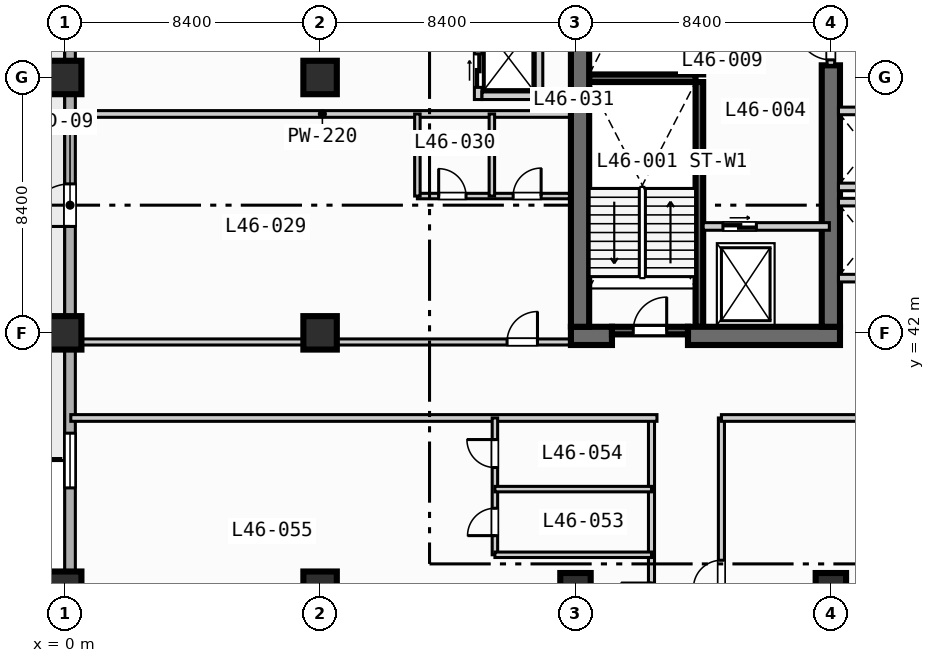
"""IFC4 building model, lengths in metres.
Left out: names, types, materials, properties, quantities, classifications, styles, units other than length and angle.
Written with IfcOpenShell. Run it as: python <this file> out.ifc"""

import sys

from ifc_helpers import new_model, si_unit, direction, frame, frame_2d, origin, origin_2d, place, context, subcontext, project, spatial, rectangle, extrude, element, fill, save


model = new_model("IFC4")
c1 = context("Model", 3, precision=1e-05, world=origin(), true_north=direction((0.0, 1.0)))
c2 = subcontext(c1, "Body", "Model", "MODEL_VIEW")
j1 = project(units=[si_unit("LENGTHUNIT", "METRE"), si_unit("PLANEANGLEUNIT", "RADIAN")], contexts=[c1])
p1 = place(None, origin())
s1 = spatial("IfcSite", under=j1, at=p1, CompositionType="ELEMENT")
p2 = place(p1, origin())
s2 = spatial("IfcBuilding", under=s1, at=p2, CompositionType="ELEMENT")
p3 = place(p2, frame((0.0, 0.0, 190.2)))
s3 = spatial("IfcBuildingStorey", under=s2, at=p3, CompositionType="ELEMENT", Elevation=190.2)
for number, where, z_axis, x_axis in (
    (1, (20.875, 42.2, 0.0), (0.0, 0.0, 1.0), (0.0, 1.0, 0.0)),
    (2, (20.875, 50.5, 0.0), (0.0, 0.0, 1.0), (0.0, 1.0, 0.0)),
):
    element("IfcWall", number, at=place(p3, frame(where, z_axis=z_axis, x_axis=x_axis)), inside=s3, PredefinedType="SOLIDWALL", context=c2, shape_type="SweptSolid", body=[
        extrude(rectangle(XDim=8.05, YDim=0.25, at=frame_2d((4.025, 0.0))), origin(), (0.0, 0.0, 1.0), 3.47),
    ])
p4 = place(p3, frame((17.25, 50.375, 0.0), z_axis=(0.0, 0.0, 1.0), x_axis=(1.0, 0.0, 0.0)))
e3 = element("IfcWall", 3, at=p4, inside=s3, PredefinedType="SOLIDWALL", context=c2, shape_type="SweptSolid", body=[
    extrude(rectangle(XDim=3.5, YDim=0.25, at=frame_2d((1.75, 0.0))), origin(), (0.0, 0.0, 1.0), 3.47),
])
p5 = place(p3, frame((16.65, 41.9, 0.0), z_axis=(0.0, 0.0, 1.0), x_axis=(1.0, 0.0, 0.0)))
e4 = element("IfcWall", 4, at=p5, inside=s3, PredefinedType="SHEAR", context=c2, shape_type="SweptSolid", body=[
    extrude(rectangle(XDim=1.35, YDim=0.6, at=frame_2d((0.675, 0.0))), origin(), (0.0, 0.0, 1.0), 3.47),
])
p6 = place(p3, frame((20.5, 41.9, 0.0), z_axis=(0.0, 0.0, 1.0), x_axis=(1.0, 0.0, 0.0)))
e5 = element("IfcWall", 5, at=p6, inside=s3, PredefinedType="SHEAR", context=c2, shape_type="SweptSolid", body=[
    extrude(rectangle(XDim=5.0, YDim=0.6, at=frame_2d((2.5, 0.0))), origin(), (0.0, 0.0, 1.0), 3.47),
])
p7 = place(p3, frame((16.95, 42.2, 0.0), z_axis=(0.0, 0.0, 1.0), x_axis=(0.0, 1.0, 0.0)))
e6 = element("IfcWall", 6, at=p7, inside=s3, PredefinedType="SHEAR", context=c2, shape_type="SweptSolid", body=[
    extrude(rectangle(XDim=16.35, YDim=0.6, at=frame_2d((8.175, 0.0))), origin(), (0.0, 0.0, 1.0), 3.47),
])
p8 = place(p3, frame((25.2, 42.2, 0.0), z_axis=(0.0, 0.0, 1.0), x_axis=(0.0, 1.0, 0.0)))
e7 = element("IfcWall", 7, at=p8, inside=s3, PredefinedType="SHEAR", context=c2, shape_type="SweptSolid", body=[
    extrude(rectangle(XDim=8.6, YDim=0.6, at=frame_2d((4.3, 0.0))), origin(), (0.0, 0.0, 1.0), 3.47),
])
for number, where, z_axis, x_axis in (
    (8, (0.0, 33.6, 0.0), (0.0, 0.0, 1.0), (1.0, 0.0, 0.0)),
    (9, (0.0, 42.0, 0.0), (0.0, 0.0, 1.0), (1.0, 0.0, 0.0)),
    (10, (0.0, 50.4, 0.0), (0.0, 0.0, 1.0), (1.0, 0.0, 0.0)),
    (11, (8.4, 33.6, 0.0), (0.0, 0.0, 1.0), (1.0, 0.0, 0.0)),
    (12, (8.4, 42.0, 0.0), (0.0, 0.0, 1.0), (1.0, 0.0, 0.0)),
    (13, (8.4, 50.4, 0.0), (0.0, 0.0, 1.0), (1.0, 0.0, 0.0)),
):
    element("IfcColumn", number, at=place(p3, frame(where, z_axis=z_axis, x_axis=x_axis)), inside=s3, PredefinedType="COLUMN", context=c2, shape_type="SweptSolid", body=[
        extrude(rectangle(XDim=1.1, YDim=1.1, at=origin_2d()), origin(), (0.0, 0.0, 1.0), 3.7),
    ])
for number, where, z_axis, x_axis in (
    (14, (16.8, 33.6, 0.0), (0.0, 0.0, 1.0), (1.0, 0.0, 0.0)),
    (15, (25.2, 33.6, 0.0), (0.0, 0.0, 1.0), (1.0, 0.0, 0.0)),
):
    element("IfcColumn", number, at=place(p3, frame(where, z_axis=z_axis, x_axis=x_axis)), inside=s3, PredefinedType="COLUMN", context=c2, shape_type="SweptSolid", body=[
        extrude(rectangle(XDim=1.0, YDim=1.0, at=origin_2d()), origin(), (0.0, 0.0, 1.0), 3.7),
    ])
p9 = place(p3, frame((0.175, 3.175, 0.0), z_axis=(0.0, 0.0, 1.0), x_axis=(0.0, 1.0, 0.0)))
e16 = element("IfcWall", 16, at=p9, inside=s3, PredefinedType="STANDARD", context=c2, shape_type="SweptSolid", body=[
    extrude(rectangle(XDim=69.25, YDim=0.35, at=frame_2d((34.625, 0.0))), origin(), (0.0, 0.0, 1.0), 3.47),
])
p10 = place(p9, frame((42.325, 0.0, 0.0)))
e17 = element("IfcOpeningElement", 17, at=p10, cuts=e16, PredefinedType="OPENING", context=c2, shape_type="SweptSolid", body=[
    extrude(rectangle(XDim=1.4, YDim=2.2, at=frame_2d((0.7, 1.1))), frame((0.0, 0.185, 0.0), z_axis=(0.0, -1.0, 0.0), x_axis=(1.0, 0.0, 0.0)), (0.0, 0.0, 1.0), 0.37),
])
p11 = place(p9, frame((25.025, 0.0, 0.85)))
e18 = element("IfcOpeningElement", 18, at=p11, cuts=e16, PredefinedType="OPENING", context=c2, shape_type="SweptSolid", body=[
    extrude(rectangle(XDim=2.4, YDim=1.95, at=frame_2d((1.2, 0.975))), frame((0.0, 0.185, 0.0), z_axis=(0.0, -1.0, 0.0), x_axis=(1.0, 0.0, 0.0)), (0.0, 0.0, 1.0), 0.37),
])
p12 = place(p9, frame((33.725, 0.0, 0.85)))
e19 = element("IfcOpeningElement", 19, at=p12, cuts=e16, PredefinedType="OPENING", context=c2, shape_type="SweptSolid", body=[
    extrude(rectangle(XDim=1.8, YDim=1.8, at=frame_2d((0.9, 0.9))), frame((0.0, 0.185, 0.0), z_axis=(0.0, -1.0, 0.0), x_axis=(1.0, 0.0, 0.0)), (0.0, 0.0, 1.0), 0.37),
])
p13 = place(p9, frame((58.375, 0.0, 0.85)))
e20 = element("IfcOpeningElement", 20, at=p13, cuts=e16, PredefinedType="OPENING", context=c2, shape_type="SweptSolid", body=[
    extrude(rectangle(XDim=1.8, YDim=1.8, at=frame_2d((0.9, 0.9))), frame((0.0, 0.185, 0.0), z_axis=(0.0, -1.0, 0.0), x_axis=(1.0, 0.0, 0.0)), (0.0, 0.0, 1.0), 0.37),
])
p14 = place(p9, frame((64.775, 0.0, 0.85)))
e21 = element("IfcOpeningElement", 21, at=p14, cuts=e16, PredefinedType="OPENING", context=c2, shape_type="SweptSolid", body=[
    extrude(rectangle(XDim=1.8, YDim=1.8, at=frame_2d((0.9, 0.9))), frame((0.0, 0.185, 0.0), z_axis=(0.0, -1.0, 0.0), x_axis=(1.0, 0.0, 0.0)), (0.0, 0.0, 1.0), 0.37),
])
p15 = place(p3, frame((18.0, 42.075, 0.0), z_axis=(0.0, 0.0, 1.0), x_axis=(1.0, 0.0, 0.0)))
e22 = element("IfcWall", 22, at=p15, inside=s3, PredefinedType="SOLIDWALL", context=c2, shape_type="SweptSolid", body=[
    extrude(rectangle(XDim=2.5, YDim=0.25, at=frame_2d((1.25, 0.0))), origin(), (0.0, 0.0, 1.0), 3.47),
])
p16 = place(p15, frame((0.7, 0.0, 0.0)))
e23 = element("IfcOpeningElement", 23, at=p16, cuts=e22, PredefinedType="OPENING", context=c2, shape_type="SweptSolid", body=[
    extrude(rectangle(XDim=1.1, YDim=2.15, at=frame_2d((0.55, 1.075))), frame((0.0, 0.135, 0.0), z_axis=(0.0, -1.0, 0.0), x_axis=(1.0, 0.0, 0.0)), (0.0, 0.0, 1.0), 0.27),
])
p17 = place(p3, frame((21.0, 45.5, 0.0), z_axis=(0.0, 0.0, 1.0), x_axis=(1.0, 0.0, 0.0)))
e24 = element("IfcWall", 24, at=p17, inside=s3, PredefinedType="SOLIDWALL", context=c2, shape_type="SweptSolid", body=[
    extrude(rectangle(XDim=4.15, YDim=0.25, at=frame_2d((2.075, 0.0))), origin(), (0.0, 0.0, 1.0), 3.47),
])
p18 = place(p17, frame((0.65, 0.0, 0.0)))
e25 = element("IfcOpeningElement", 25, at=p18, cuts=e24, PredefinedType="OPENING", context=c2, shape_type="SweptSolid", body=[
    extrude(rectangle(XDim=1.1, YDim=2.15, at=frame_2d((0.55, 1.075))), frame((0.0, 0.135, 0.0), z_axis=(0.0, -1.0, 0.0), x_axis=(1.0, 0.0, 0.0)), (0.0, 0.0, 1.0), 0.27),
])
p19 = place(p3, frame((25.2, 50.8, 0.0), z_axis=(0.0, 0.0, 1.0), x_axis=(0.0, 1.0, 0.0)))
e26 = element("IfcWall", 26, at=p19, inside=s3, PredefinedType="SOLIDWALL", context=c2, shape_type="SweptSolid", body=[
    extrude(rectangle(XDim=1.48, YDim=0.25, at=frame_2d((0.74, 0.0))), origin(), (0.0, 0.0, 1.0), 3.47),
])
p20 = place(p19, frame((0.18, 0.0, 0.0)))
e27 = element("IfcOpeningElement", 27, at=p20, cuts=e26, PredefinedType="OPENING", context=c2, shape_type="SweptSolid", body=[
    extrude(rectangle(XDim=1.1, YDim=2.15, at=frame_2d((0.55, 1.075))), frame((0.0, 0.135, 0.0), z_axis=(0.0, -1.0, 0.0), x_axis=(1.0, 0.0, 0.0)), (0.0, 0.0, 1.0), 0.27),
])
p21 = place(p3, frame((13.6, 49.675, 0.0), z_axis=(0.0, 0.0, 1.0), x_axis=(0.0, 1.0, 0.0)))
e28 = element("IfcWall", 28, at=p21, inside=s3, PredefinedType="SOLIDWALL", context=c2, shape_type="SweptSolid", body=[
    extrude(rectangle(XDim=2.75, YDim=0.25, at=frame_2d((1.375, 0.0))), origin(), (0.0, 0.0, 1.0), 3.47),
])
p22 = place(p21, frame((0.4, 0.0, 0.0)))
e29 = element("IfcOpeningElement", 29, at=p22, cuts=e28, PredefinedType="OPENING", context=c2, shape_type="SweptSolid", body=[
    extrude(rectangle(XDim=1.1, YDim=2.15, at=frame_2d((0.55, 1.075))), frame((0.0, 0.135, 0.0), z_axis=(0.0, -1.0, 0.0), x_axis=(1.0, 0.0, 0.0)), (0.0, 0.0, 1.0), 0.27),
])
p23 = place(p3, frame((15.6, 49.675, 0.0), z_axis=(0.0, 0.0, 1.0), x_axis=(0.0, 1.0, 0.0)))
e30 = element("IfcWall", 30, at=p23, inside=s3, PredefinedType="SOLIDWALL", context=c2, shape_type="SweptSolid", body=[
    extrude(rectangle(XDim=2.75, YDim=0.25, at=frame_2d((1.375, 0.0))), origin(), (0.0, 0.0, 1.0), 3.47),
])
p24 = place(p3, frame((13.725, 49.8, 0.0), z_axis=(0.0, 0.0, 1.0), x_axis=(1.0, 0.0, 0.0)))
e31 = element("IfcWall", 31, at=p24, inside=s3, PredefinedType="SOLIDWALL", context=c2, shape_type="SweptSolid", body=[
    extrude(rectangle(XDim=1.75, YDim=0.25, at=frame_2d((0.875, 0.0))), origin(), (0.0, 0.0, 1.0), 3.47),
])
for number, where, z_axis, x_axis in (
    (32, (25.45, 43.8, 0.0), (0.0, 0.0, 1.0), (1.0, 0.0, 0.0)),
    (33, (25.45, 46.3, 0.0), (0.0, 0.0, 1.0), (1.0, 0.0, 0.0)),
    (34, (25.45, 46.8, 0.0), (0.0, 0.0, 1.0), (1.0, 0.0, 0.0)),
    (35, (25.45, 49.3, 0.0), (0.0, 0.0, 1.0), (1.0, 0.0, 0.0)),
):
    element("IfcWall", number, at=place(p3, frame(where, z_axis=z_axis, x_axis=x_axis)), inside=s3, PredefinedType="SOLIDWALL", context=c2, shape_type="SweptSolid", body=[
        extrude(rectangle(XDim=1.825, YDim=0.25, at=frame_2d((0.913, 0.0))), origin(), (0.0, 0.0, 1.0), 3.47),
    ])
p25 = place(p3, frame((0.35, 41.7, 0.0), z_axis=(0.0, 0.0, 1.0), x_axis=(1.0, 0.0, 0.0)))
e36 = element("IfcWall", 36, at=p25, inside=s3, PredefinedType="PARTITIONING", context=c2, shape_type="SweptSolid", body=[
    extrude(rectangle(XDim=16.25, YDim=0.2, at=frame_2d((8.125, 0.0))), origin(), (0.0, 0.0, 1.0), 2.82),
])
p26 = place(p25, frame((14.2, 0.0, 0.0)))
e37 = element("IfcOpeningElement", 37, at=p26, cuts=e36, PredefinedType="OPENING", context=c2, shape_type="SweptSolid", body=[
    extrude(rectangle(XDim=1.0, YDim=2.15, at=frame_2d((0.5, 1.075))), frame((0.0, 0.11, 0.0), z_axis=(0.0, -1.0, 0.0), x_axis=(1.0, 0.0, 0.0)), (0.0, 0.0, 1.0), 0.22),
])
p27 = place(p3, frame((0.35, 49.2, 0.0), z_axis=(0.0, 0.0, 1.0), x_axis=(1.0, 0.0, 0.0)))
e38 = element("IfcWall", 38, at=p27, inside=s3, PredefinedType="PARTITIONING", context=c2, shape_type="SweptSolid", body=[
    extrude(rectangle(XDim=16.25, YDim=0.22, at=frame_2d((8.125, 0.0))), origin(), (0.0, 0.0, 1.0), 3.47),
])
p28 = place(p3, frame((11.6, 46.5, 0.0), z_axis=(0.0, 0.0, 1.0), x_axis=(1.0, 0.0, 0.0)))
e39 = element("IfcWall", 39, at=p28, inside=s3, PredefinedType="PLUMBINGWALL", context=c2, shape_type="SweptSolid", body=[
    extrude(rectangle(XDim=5.0, YDim=0.18, at=frame_2d((2.5, 0.0))), origin(), (0.0, 0.0, 1.0), 3.47),
])
p29 = place(p28, frame((0.7, 0.0, 0.0)))
e40 = element("IfcOpeningElement", 40, at=p29, cuts=e39, PredefinedType="OPENING", context=c2, shape_type="SweptSolid", body=[
    extrude(rectangle(XDim=0.9, YDim=2.1, at=frame_2d((0.45, 1.05))), frame((0.0, 0.1, 0.0), z_axis=(0.0, -1.0, 0.0), x_axis=(1.0, 0.0, 0.0)), (0.0, 0.0, 1.0), 0.2),
])
p30 = place(p28, frame((3.15, 0.0, 0.0)))
e41 = element("IfcOpeningElement", 41, at=p30, cuts=e39, PredefinedType="OPENING", context=c2, shape_type="SweptSolid", body=[
    extrude(rectangle(XDim=0.92, YDim=2.1, at=frame_2d((0.46, 1.05))), frame((0.0, 0.1, 0.0), z_axis=(0.0, -1.0, 0.0), x_axis=(1.0, 0.0, 0.0)), (0.0, 0.0, 1.0), 0.2),
])
for number, where, z_axis, x_axis in (
    (42, (11.6, 46.5, 0.0), (0.0, 0.0, 1.0), (0.0, 1.0, 0.0)),
    (43, (14.05, 46.5, 0.0), (0.0, 0.0, 1.0), (0.0, 1.0, 0.0)),
):
    element("IfcWall", number, at=place(p3, frame(where, z_axis=z_axis, x_axis=x_axis)), inside=s3, PredefinedType="PLUMBINGWALL", context=c2, shape_type="SweptSolid", body=[
        extrude(rectangle(XDim=2.7, YDim=0.18, at=frame_2d((1.35, 0.0))), origin(), (0.0, 0.0, 1.0), 3.47),
    ])
p31 = place(p3, frame((21.6, 24.2, 0.0), z_axis=(0.0, 0.0, 1.0), x_axis=(0.0, 1.0, 0.0)))
e44 = element("IfcWall", 44, at=p31, inside=s3, PredefinedType="PARTITIONING", context=c2, shape_type="SweptSolid", body=[
    extrude(rectangle(XDim=15.0, YDim=0.2, at=frame_2d((7.5, 0.0))), origin(), (0.0, 0.0, 1.0), 3.47),
])
p32 = place(p31, frame((2.0, 0.0, 0.0)))
e45 = element("IfcOpeningElement", 45, at=p32, cuts=e44, PredefinedType="OPENING", context=c2, shape_type="SweptSolid", body=[
    extrude(rectangle(XDim=0.92, YDim=2.1, at=frame_2d((0.46, 1.05))), frame((0.0, 0.11, 0.0), z_axis=(0.0, -1.0, 0.0), x_axis=(1.0, 0.0, 0.0)), (0.0, 0.0, 1.0), 0.22),
])
p33 = place(p31, frame((9.4, 0.0, 0.0)))
e46 = element("IfcOpeningElement", 46, at=p33, cuts=e44, PredefinedType="OPENING", context=c2, shape_type="SweptSolid", body=[
    extrude(rectangle(XDim=0.92, YDim=2.1, at=frame_2d((0.46, 1.05))), frame((0.0, 0.11, 0.0), z_axis=(0.0, -1.0, 0.0), x_axis=(1.0, 0.0, 0.0)), (0.0, 0.0, 1.0), 0.22),
])
p34 = place(p3, frame((21.6, 39.2, 0.0), z_axis=(0.0, 0.0, 1.0), x_axis=(1.0, 0.0, 0.0)))
e47 = element("IfcWall", 47, at=p34, inside=s3, PredefinedType="PARTITIONING", context=c2, shape_type="SweptSolid", body=[
    extrude(rectangle(XDim=11.7, YDim=0.22, at=frame_2d((5.85, 0.0))), origin(), (0.0, 0.0, 1.0), 3.47),
])
p35 = place(p3, frame((19.3, 24.4, 0.0), z_axis=(0.0, 0.0, 1.0), x_axis=(0.0, 1.0, 0.0)))
e48 = element("IfcWall", 48, at=p35, inside=s3, PredefinedType="PARTITIONING", context=c2, shape_type="SweptSolid", body=[
    extrude(rectangle(XDim=14.8, YDim=0.2, at=frame_2d((7.4, 0.0))), origin(), (0.0, 0.0, 1.0), 3.47),
])
p36 = place(p35, frame((0.97, 0.0, 0.0)))
e49 = element("IfcOpeningElement", 49, at=p36, cuts=e48, PredefinedType="OPENING", context=c2, shape_type="SweptSolid", body=[
    extrude(rectangle(XDim=1.0, YDim=2.15, at=frame_2d((0.5, 1.075))), frame((0.0, 0.11, 0.0), z_axis=(0.0, -1.0, 0.0), x_axis=(1.0, 0.0, 0.0)), (0.0, 0.0, 1.0), 0.22),
])
p37 = place(p35, frame((8.37, 0.0, 0.0)))
e50 = element("IfcOpeningElement", 50, at=p37, cuts=e48, PredefinedType="OPENING", context=c2, shape_type="SweptSolid", body=[
    extrude(rectangle(XDim=1.0, YDim=2.15, at=frame_2d((0.5, 1.075))), frame((0.0, 0.11, 0.0), z_axis=(0.0, -1.0, 0.0), x_axis=(1.0, 0.0, 0.0)), (0.0, 0.0, 1.0), 0.22),
])
p38 = place(p3, frame((0.2, 39.2, 0.0), z_axis=(0.0, 0.0, 1.0), x_axis=(1.0, 0.0, 0.0)))
e51 = element("IfcWall", 51, at=p38, inside=s3, PredefinedType="PARTITIONING", context=c2, shape_type="SweptSolid", body=[
    extrude(rectangle(XDim=19.28, YDim=0.22, at=frame_2d((9.64, 0.0))), origin(), (0.0, 0.0, 1.0), 3.47),
])
p39 = place(p3, frame((14.15, 34.7, 0.0), z_axis=(0.0, 0.0, 1.0), x_axis=(0.0, 1.0, 0.0)))
e52 = element("IfcWall", 52, at=p39, inside=s3, PredefinedType="PLUMBINGWALL", context=c2, shape_type="SweptSolid", body=[
    extrude(rectangle(XDim=4.5, YDim=0.18, at=frame_2d((2.25, 0.0))), origin(), (0.0, 0.0, 1.0), 3.47),
])
p40 = place(p39, frame((0.63, 0.0, 0.0)))
e53 = element("IfcOpeningElement", 53, at=p40, cuts=e52, PredefinedType="OPENING", context=c2, shape_type="SweptSolid", body=[
    extrude(rectangle(XDim=0.9, YDim=2.1, at=frame_2d((0.45, 1.05))), frame((0.0, 0.1, 0.0), z_axis=(0.0, -1.0, 0.0), x_axis=(1.0, 0.0, 0.0)), (0.0, 0.0, 1.0), 0.2),
])
p41 = place(p39, frame((2.87, 0.0, 0.0)))
e54 = element("IfcOpeningElement", 54, at=p41, cuts=e52, PredefinedType="OPENING", context=c2, shape_type="SweptSolid", body=[
    extrude(rectangle(XDim=0.92, YDim=2.1, at=frame_2d((0.46, 1.05))), frame((0.0, 0.1, 0.0), z_axis=(0.0, -1.0, 0.0), x_axis=(1.0, 0.0, 0.0)), (0.0, 0.0, 1.0), 0.2),
])
for number, where, z_axis, x_axis in (
    (55, (14.15, 34.7, 0.0), (0.0, 0.0, 1.0), (1.0, 0.0, 0.0)),
    (56, (14.15, 36.86, 0.0), (0.0, 0.0, 1.0), (1.0, 0.0, 0.0)),
):
    element("IfcWall", number, at=place(p3, frame(where, z_axis=z_axis, x_axis=x_axis)), inside=s3, PredefinedType="PLUMBINGWALL", context=c2, shape_type="SweptSolid", body=[
        extrude(rectangle(XDim=5.15, YDim=0.18, at=frame_2d((2.575, 0.0))), origin(), (0.0, 0.0, 1.0), 3.47),
    ])
p42 = place(p10, origin())
e57 = element("IfcDoor", 57, at=p42, inside=s3, OperationType="SINGLE_SWING_LEFT", PredefinedType="DOOR", context=c2, shape_type="SweptSolid", body=[
    extrude(rectangle(XDim=1.4, YDim=2.2, at=frame_2d((0.7, 1.1))), frame((0.0, 0.025, 0.0), z_axis=(0.0, -1.0, 0.0), x_axis=(1.0, 0.0, 0.0)), (0.0, 0.0, 1.0), 0.05),
])
fill(e17, e57)
p43 = place(p12, origin())
e58 = element("IfcWindow", 58, at=p43, inside=s3, PartitioningType="SINGLE_PANEL", PredefinedType="WINDOW", context=c2, shape_type="SweptSolid", body=[
    extrude(rectangle(XDim=1.8, YDim=1.8, at=frame_2d((0.9, 0.9))), frame((0.0, 0.03, 0.0), z_axis=(0.0, -1.0, 0.0), x_axis=(1.0, 0.0, 0.0)), (0.0, 0.0, 1.0), 0.06),
])
fill(e19, e58)
p44 = place(p16, origin())
e59 = element("IfcDoor", 59, at=p44, inside=s3, OperationType="SINGLE_SWING_RIGHT", PredefinedType="DOOR", context=c2, shape_type="SweptSolid", body=[
    extrude(rectangle(XDim=1.1, YDim=2.15, at=frame_2d((0.55, 1.075))), frame((0.0, 0.025, 0.0), z_axis=(0.0, -1.0, 0.0), x_axis=(1.0, 0.0, 0.0)), (0.0, 0.0, 1.0), 0.05),
])
fill(e23, e59)
p45 = place(p18, origin())
e60 = element("IfcDoor", 60, at=p45, inside=s3, OperationType="SLIDING_TO_LEFT", PredefinedType="DOOR", context=c2, shape_type="SweptSolid", body=[
    extrude(rectangle(XDim=1.1, YDim=2.15, at=frame_2d((0.55, 1.075))), frame((0.0, 0.025, 0.0), z_axis=(0.0, -1.0, 0.0), x_axis=(1.0, 0.0, 0.0)), (0.0, 0.0, 1.0), 0.05),
])
fill(e25, e60)
p46 = place(p20, origin())
e61 = element("IfcDoor", 61, at=p46, inside=s3, OperationType="SINGLE_SWING_RIGHT", PredefinedType="DOOR", context=c2, shape_type="SweptSolid", body=[
    extrude(rectangle(XDim=1.1, YDim=2.15, at=frame_2d((0.55, 1.075))), frame((0.0, 0.025, 0.0), z_axis=(0.0, -1.0, 0.0), x_axis=(1.0, 0.0, 0.0)), (0.0, 0.0, 1.0), 0.05),
])
fill(e27, e61)
p47 = place(p22, origin())
e62 = element("IfcDoor", 62, at=p47, inside=s3, OperationType="SLIDING_TO_LEFT", PredefinedType="DOOR", context=c2, shape_type="SweptSolid", body=[
    extrude(rectangle(XDim=1.1, YDim=2.15, at=frame_2d((0.55, 1.075))), frame((0.0, 0.025, 0.0), z_axis=(0.0, -1.0, 0.0), x_axis=(1.0, 0.0, 0.0)), (0.0, 0.0, 1.0), 0.05),
])
fill(e29, e62)
p48 = place(p26, origin())
e63 = element("IfcDoor", 63, at=p48, inside=s3, OperationType="SINGLE_SWING_RIGHT", PredefinedType="DOOR", context=c2, shape_type="SweptSolid", body=[
    extrude(rectangle(XDim=1.0, YDim=2.15, at=frame_2d((0.5, 1.075))), frame((0.0, 0.025, 0.0), z_axis=(0.0, -1.0, 0.0), x_axis=(1.0, 0.0, 0.0)), (0.0, 0.0, 1.0), 0.05),
])
fill(e37, e63)
p49 = place(p29, origin())
e64 = element("IfcDoor", 64, at=p49, inside=s3, OperationType="SINGLE_SWING_LEFT", PredefinedType="DOOR", context=c2, shape_type="SweptSolid", body=[
    extrude(rectangle(XDim=0.9, YDim=2.1, at=frame_2d((0.45, 1.05))), frame((0.0, 0.025, 0.0), z_axis=(0.0, -1.0, 0.0), x_axis=(1.0, 0.0, 0.0)), (0.0, 0.0, 1.0), 0.05),
])
fill(e40, e64)
p50 = place(p30, origin())
e65 = element("IfcDoor", 65, at=p50, inside=s3, OperationType="SINGLE_SWING_RIGHT", PredefinedType="DOOR", context=c2, shape_type="SweptSolid", body=[
    extrude(rectangle(XDim=0.92, YDim=2.1, at=frame_2d((0.46, 1.05))), frame((0.0, 0.025, 0.0), z_axis=(0.0, -1.0, 0.0), x_axis=(1.0, 0.0, 0.0)), (0.0, 0.0, 1.0), 0.05),
])
fill(e41, e65)
p51 = place(p33, origin())
e66 = element("IfcDoor", 66, at=p51, inside=s3, OperationType="SINGLE_SWING_LEFT", PredefinedType="DOOR", context=c2, shape_type="SweptSolid", body=[
    extrude(rectangle(XDim=0.92, YDim=2.1, at=frame_2d((0.46, 1.05))), frame((0.0, 0.025, 0.0), z_axis=(0.0, -1.0, 0.0), x_axis=(1.0, 0.0, 0.0)), (0.0, 0.0, 1.0), 0.05),
])
fill(e46, e66)
p52 = place(p40, origin())
e67 = element("IfcDoor", 67, at=p52, inside=s3, OperationType="SINGLE_SWING_LEFT", PredefinedType="DOOR", context=c2, shape_type="SweptSolid", body=[
    extrude(rectangle(XDim=0.9, YDim=2.1, at=frame_2d((0.45, 1.05))), frame((0.0, 0.025, 0.0), z_axis=(0.0, -1.0, 0.0), x_axis=(1.0, 0.0, 0.0)), (0.0, 0.0, 1.0), 0.05),
])
fill(e53, e67)
p53 = place(p41, origin())
e68 = element("IfcDoor", 68, at=p53, inside=s3, OperationType="SINGLE_SWING_RIGHT", PredefinedType="DOOR", context=c2, shape_type="SweptSolid", body=[
    extrude(rectangle(XDim=0.92, YDim=2.1, at=frame_2d((0.46, 1.05))), frame((0.0, 0.025, 0.0), z_axis=(0.0, -1.0, 0.0), x_axis=(1.0, 0.0, 0.0)), (0.0, 0.0, 1.0), 0.05),
])
fill(e54, e68)
save(model, sys.argv[1])
